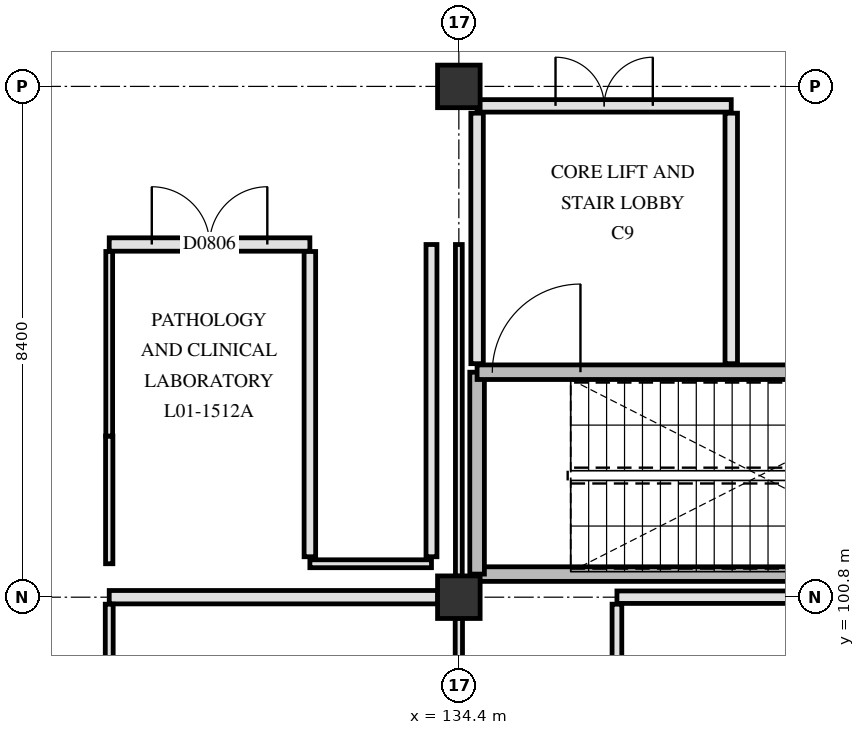
"""IFC4 building model, lengths in metres.
Left out: names, types, materials, properties, quantities, classifications, styles, units other than length and angle.
Written with IfcOpenShell. Run it as: python <this file> out.ifc"""

import sys

from ifc_helpers import new_model, si_unit, direction, frame, frame_2d, origin, origin_2d, place, context, subcontext, project, spatial, rectangle, extrude, element, fill, save


model = new_model("IFC4")
c1 = context("Model", 3, precision=1e-05, world=origin(), true_north=direction((0.0, 1.0)))
c2 = subcontext(c1, "Body", "Model", "MODEL_VIEW")
j1 = project(units=[si_unit("LENGTHUNIT", "METRE"), si_unit("PLANEANGLEUNIT", "RADIAN")], contexts=[c1])
p1 = place(None, origin())
s1 = spatial("IfcSite", under=j1, at=p1, CompositionType="ELEMENT")
p2 = place(p1, origin())
s2 = spatial("IfcBuilding", under=s1, at=p2, CompositionType="ELEMENT")
p3 = place(p2, frame((0.0, 0.0, 4.8)))
s3 = spatial("IfcBuildingStorey", under=s2, at=p3, CompositionType="ELEMENT", Elevation=4.8)
for number, where, z_axis, x_axis in (
    (1, (134.4, 100.8, 0.0), (0.0, 0.0, 1.0), (1.0, 0.0, 0.0)),
    (2, (134.4, 109.2, 0.0), (0.0, 0.0, 1.0), (1.0, 0.0, 0.0)),
):
    element("IfcColumn", number, at=place(p3, frame(where, z_axis=z_axis, x_axis=x_axis)), inside=s3, PredefinedType="COLUMN", context=c2, shape_type="SweptSolid", body=[
        extrude(rectangle(XDim=0.7, YDim=0.7, at=origin_2d()), origin(), (0.0, 0.0, 1.0), 4.5),
    ])
p4 = place(p3, frame((134.7, 101.18, 0.0), z_axis=(0.0, 0.0, 1.0), x_axis=(1.0, 0.0, 0.0)))
e3 = element("IfcWall", 3, at=p4, inside=s3, PredefinedType="SHEAR", context=c2, shape_type="SweptSolid", body=[
    extrude(rectangle(XDim=7.82, YDim=0.24, at=frame_2d((3.91, 0.0))), origin(), (0.0, 0.0, 1.0), 4.15),
])
p5 = place(p3, frame((134.7, 101.18, 0.0), z_axis=(0.0, 0.0, 1.0), x_axis=(0.0, 1.0, 0.0)))
e4 = element("IfcWall", 4, at=p5, inside=s3, PredefinedType="SHEAR", context=c2, shape_type="SweptSolid", body=[
    extrude(rectangle(XDim=3.32, YDim=0.24, at=frame_2d((1.66, 0.0))), origin(), (0.0, 0.0, 1.0), 4.15),
])
p6 = place(p3, frame((134.7, 104.5, 0.0), z_axis=(0.0, 0.0, 1.0), x_axis=(1.0, 0.0, 0.0)))
e5 = element("IfcWall", 5, at=p6, inside=s3, PredefinedType="SHEAR", context=c2, shape_type="SweptSolid", body=[
    extrude(rectangle(XDim=7.82, YDim=0.24, at=frame_2d((3.91, 0.0))), origin(), (0.0, 0.0, 1.0), 4.15),
])
p7 = place(p6, frame((0.25, 0.0, 0.0)))
e6 = element("IfcOpeningElement", 6, at=p7, cuts=e5, PredefinedType="OPENING", context=c2, shape_type="SweptSolid", body=[
    extrude(rectangle(XDim=1.45, YDim=2.2, at=frame_2d((0.725, 1.1))), frame((0.0, 0.13, 0.0), z_axis=(0.0, -1.0, 0.0), x_axis=(1.0, 0.0, 0.0)), (0.0, 0.0, 1.0), 0.26),
])
p8 = place(p3, frame((138.88, 104.64, 0.0), z_axis=(0.0, 0.0, 1.0), x_axis=(0.0, 1.0, 0.0)))
e7 = element("IfcWall", 7, at=p8, inside=s3, PredefinedType="PARTITIONING", context=c2, shape_type="SweptSolid", body=[
    extrude(rectangle(XDim=4.12, YDim=0.205, at=frame_2d((2.06, 0.0))), origin(), (0.0, 0.0, 1.0), 4.14),
])
p9 = place(p3, frame((134.7, 104.64, 0.0), z_axis=(0.0, 0.0, 1.0), x_axis=(0.0, 1.0, 0.0)))
e8 = element("IfcWall", 8, at=p9, inside=s3, PredefinedType="PARTITIONING", context=c2, shape_type="SweptSolid", body=[
    extrude(rectangle(XDim=4.12, YDim=0.205, at=frame_2d((2.06, 0.0))), origin(), (0.0, 0.0, 1.0), 3.59),
])
p10 = place(p3, frame((134.7, 108.88, 0.0), z_axis=(0.0, 0.0, 1.0), x_axis=(1.0, 0.0, 0.0)))
e9 = element("IfcWall", 9, at=p10, inside=s3, PredefinedType="PARTITIONING", context=c2, shape_type="SweptSolid", body=[
    extrude(rectangle(XDim=4.18, YDim=0.205, at=frame_2d((2.09, 0.0))), origin(), (0.0, 0.0, 1.0), 3.54),
])
p11 = place(p10, frame((1.29, 0.0, 0.0)))
e10 = element("IfcOpeningElement", 10, at=p11, cuts=e9, PredefinedType="OPENING", context=c2, shape_type="SweptSolid", body=[
    extrude(rectangle(XDim=1.6, YDim=2.25, at=frame_2d((0.8, 1.125))), frame((0.0, 0.113, 0.0), z_axis=(0.0, -1.0, 0.0), x_axis=(1.0, 0.0, 0.0)), (0.0, 0.0, 1.0), 0.225),
])
p12 = place(p3, frame((128.65, 100.8, 0.0), z_axis=(0.0, 0.0, 1.0), x_axis=(1.0, 0.0, 0.0)))
e11 = element("IfcWall", 11, at=p12, inside=s3, PredefinedType="PARTITIONING", context=c2, shape_type="SweptSolid", body=[
    extrude(rectangle(XDim=5.405, YDim=0.22, at=frame_2d((2.703, 0.0))), origin(), (0.0, 0.0, 1.0), 3.54),
])
p13 = place(p3, frame((137.0, 100.8, 0.0), z_axis=(0.0, 0.0, 1.0), x_axis=(1.0, 0.0, 0.0)))
e12 = element("IfcWall", 12, at=p13, inside=s3, PredefinedType="PARTITIONING", context=c2, shape_type="SweptSolid", body=[
    extrude(rectangle(XDim=5.455, YDim=0.205, at=frame_2d((2.728, 0.0))), origin(), (0.0, 0.0, 1.0), 3.54),
])
p14 = place(p3, frame((131.95, 101.35, 0.0), z_axis=(0.0, 0.0, 1.0), x_axis=(1.0, 0.0, 0.0)))
e13 = element("IfcWall", 13, at=p14, inside=s3, PredefinedType="PARTITIONING", context=c2, shape_type="SweptSolid", body=[
    extrude(rectangle(XDim=2.0, YDim=0.13, at=frame_2d((1.0, 0.0))), origin(), (0.0, 0.0, 1.0), 4.14),
])
p15 = place(p3, frame((128.65, 106.6, 0.0), z_axis=(0.0, 0.0, 1.0), x_axis=(1.0, 0.0, 0.0)))
e14 = element("IfcWall", 14, at=p15, inside=s3, PredefinedType="PARTITIONING", context=c2, shape_type="SweptSolid", body=[
    extrude(rectangle(XDim=3.3, YDim=0.22, at=frame_2d((1.65, 0.0))), origin(), (0.0, 0.0, 1.0), 4.14),
])
p16 = place(p15, frame((0.7, 0.0, 0.0)))
e15 = element("IfcOpeningElement", 15, at=p16, cuts=e14, PredefinedType="OPENING", context=c2, shape_type="SweptSolid", body=[
    extrude(rectangle(XDim=1.9, YDim=2.3, at=frame_2d((0.95, 1.15))), frame((0.0, 0.12, 0.0), z_axis=(0.0, -1.0, 0.0), x_axis=(1.0, 0.0, 0.0)), (0.0, 0.0, 1.0), 0.24),
])
p17 = place(p3, frame((128.65, 95.115, 0.0), z_axis=(0.0, 0.0, 1.0), x_axis=(0.0, 1.0, 0.0)))
e16 = element("IfcWall", 16, at=p17, inside=s3, PredefinedType="PARTITIONING", context=c2, shape_type="SweptSolid", body=[
    extrude(rectangle(XDim=5.57, YDim=0.13, at=frame_2d((2.785, 0.0))), origin(), (0.0, 0.0, 1.0), 3.54),
])
p18 = place(p3, frame((128.65, 101.35, 0.0), z_axis=(0.0, 0.0, 1.0), x_axis=(0.0, 1.0, 0.0)))
e17 = element("IfcWall", 17, at=p18, inside=s3, PredefinedType="PARTITIONING", context=c2, shape_type="SweptSolid", body=[
    extrude(rectangle(XDim=2.1, YDim=0.12, at=frame_2d((1.05, 0.0))), origin(), (0.0, 0.0, 1.0), 4.14),
])
p19 = place(p3, frame((128.65, 103.45, 0.0), z_axis=(0.0, 0.0, 1.0), x_axis=(0.0, 1.0, 0.0)))
e18 = element("IfcWall", 18, at=p19, inside=s3, PredefinedType="PARTITIONING", context=c2, shape_type="SweptSolid", body=[
    extrude(rectangle(XDim=3.035, YDim=0.112, at=frame_2d((1.518, 0.0))), origin(), (0.0, 0.0, 1.0), 4.14),
])
p20 = place(p3, frame((131.95, 101.465, 0.0), z_axis=(0.0, 0.0, 1.0), x_axis=(0.0, 1.0, 0.0)))
e19 = element("IfcWall", 19, at=p20, inside=s3, PredefinedType="PARTITIONING", context=c2, shape_type="SweptSolid", body=[
    extrude(rectangle(XDim=5.02, YDim=0.19, at=frame_2d((2.51, 0.0))), origin(), (0.0, 0.0, 1.0), 4.14),
])
p21 = place(p3, frame((133.95, 101.465, 0.0), z_axis=(0.0, 0.0, 1.0), x_axis=(0.0, 1.0, 0.0)))
e20 = element("IfcWall", 20, at=p21, inside=s3, PredefinedType="PARTITIONING", context=c2, shape_type="SweptSolid", body=[
    extrude(rectangle(XDim=5.135, YDim=0.18, at=frame_2d((2.567, 0.0))), origin(), (0.0, 0.0, 1.0), 4.14),
])
p22 = place(p3, frame((134.4, 95.115, 0.0), z_axis=(0.0, 0.0, 1.0), x_axis=(0.0, 1.0, 0.0)))
e21 = element("IfcWall", 21, at=p22, inside=s3, PredefinedType="PARTITIONING", context=c2, shape_type="SweptSolid", body=[
    extrude(rectangle(XDim=5.34, YDim=0.12, at=frame_2d((2.67, 0.0))), origin(), (0.0, 0.0, 1.0), 3.59),
])
p23 = place(p3, frame((134.4, 101.145, 0.0), z_axis=(0.0, 0.0, 1.0), x_axis=(0.0, 1.0, 0.0)))
e22 = element("IfcWall", 22, at=p23, inside=s3, PredefinedType="PARTITIONING", context=c2, shape_type="SweptSolid", body=[
    extrude(rectangle(XDim=5.455, YDim=0.112, at=frame_2d((2.728, 0.0))), origin(), (0.0, 0.0, 1.0), 3.59),
])
p24 = place(p3, frame((137.0, 95.115, 0.0), z_axis=(0.0, 0.0, 1.0), x_axis=(0.0, 1.0, 0.0)))
e23 = element("IfcWall", 23, at=p24, inside=s3, PredefinedType="PARTITIONING", context=c2, shape_type="SweptSolid", body=[
    extrude(rectangle(XDim=5.57, YDim=0.16, at=frame_2d((2.785, 0.0))), origin(), (0.0, 0.0, 1.0), 3.54),
])
p25 = place(p7, origin())
e24 = element("IfcDoor", 24, at=p25, inside=s3, OperationType="SINGLE_SWING_RIGHT", PredefinedType="DOOR", context=c2, shape_type="SweptSolid", body=[
    extrude(rectangle(XDim=1.45, YDim=2.2, at=frame_2d((0.725, 1.1))), frame((0.0, 0.025, 0.0), z_axis=(0.0, -1.0, 0.0), x_axis=(1.0, 0.0, 0.0)), (0.0, 0.0, 1.0), 0.05),
])
fill(e6, e24)
p26 = place(p11, origin())
e25 = element("IfcDoor", 25, at=p26, inside=s3, OperationType="DOUBLE_SWING_LEFT", PredefinedType="DOOR", context=c2, shape_type="SweptSolid", body=[
    extrude(rectangle(XDim=1.6, YDim=2.25, at=frame_2d((0.8, 1.125))), frame((0.0, 0.025, 0.0), z_axis=(0.0, -1.0, 0.0), x_axis=(1.0, 0.0, 0.0)), (0.0, 0.0, 1.0), 0.05),
])
fill(e10, e25)
p27 = place(p16, origin())
e26 = element("IfcDoor", 26, at=p27, inside=s3, OperationType="DOUBLE_SWING_LEFT", PredefinedType="DOOR", context=c2, shape_type="SweptSolid", body=[
    extrude(rectangle(XDim=1.9, YDim=2.3, at=frame_2d((0.95, 1.15))), frame((0.0, 0.025, 0.0), z_axis=(0.0, -1.0, 0.0), x_axis=(1.0, 0.0, 0.0)), (0.0, 0.0, 1.0), 0.05),
])
fill(e15, e26)
save(model, sys.argv[1])
